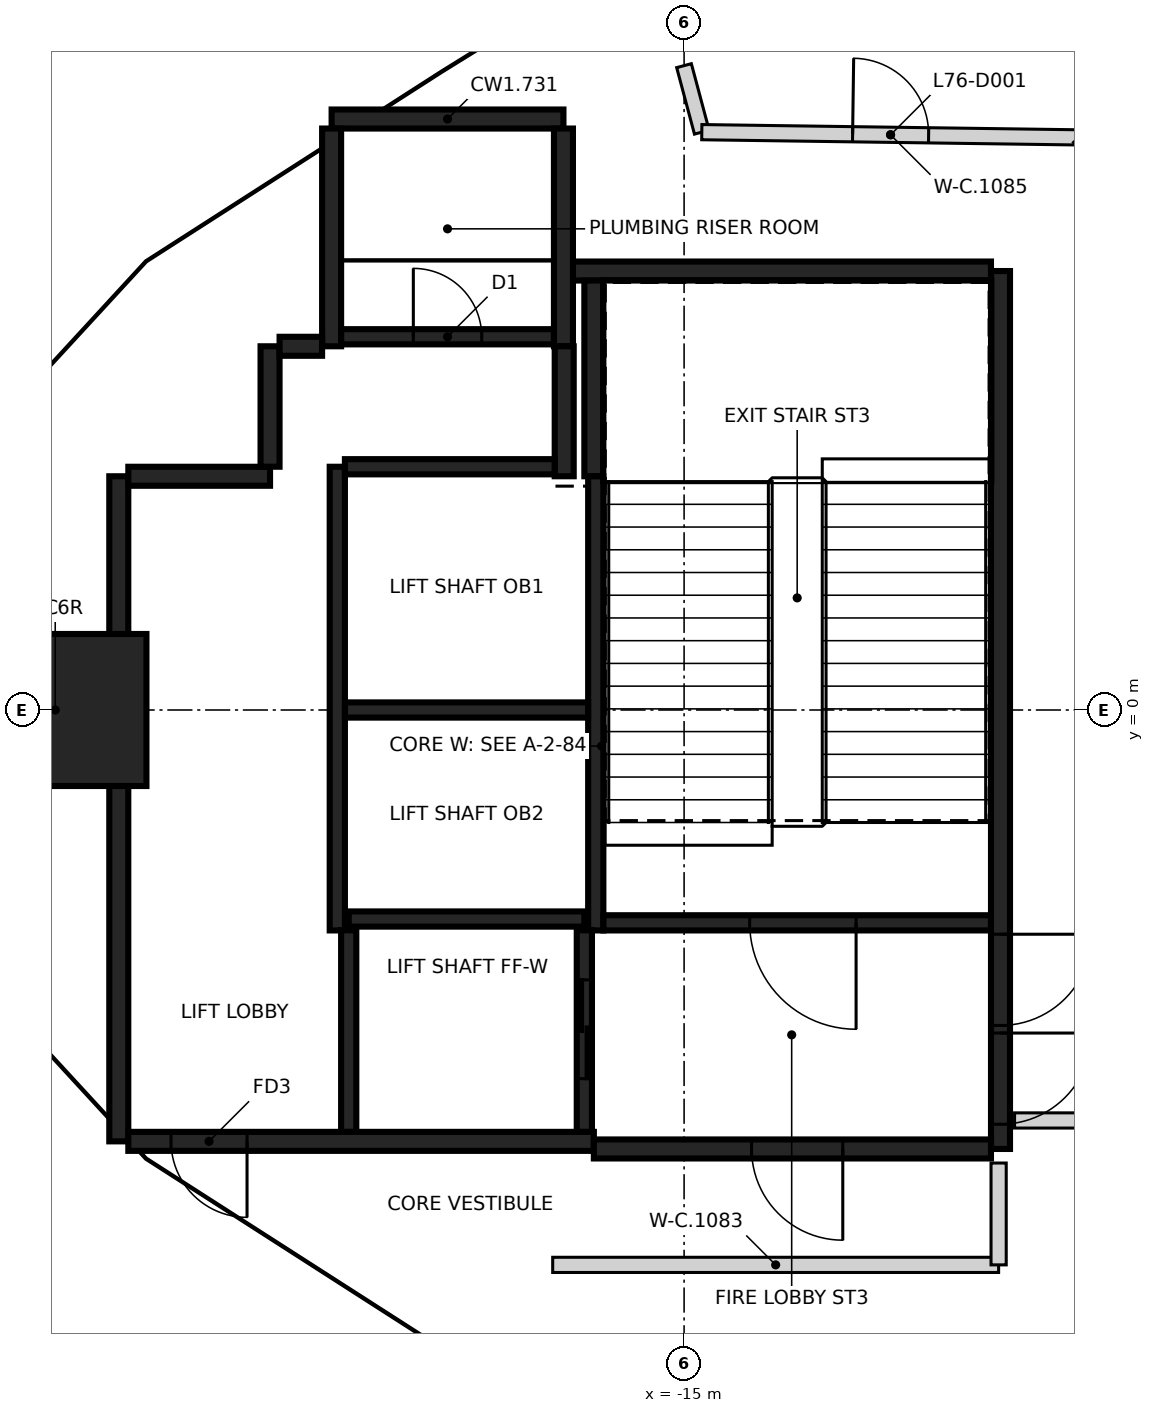
"""IFC4 building model, lengths in metres.
Left out: names, types, materials, properties, quantities, classifications, styles, units other than length and angle.
Written with IfcOpenShell. Run it as: python <this file> out.ifc"""

import sys

from ifc_helpers import new_model, si_unit, direction, frame, frame_2d, origin, origin_2d, place, context, subcontext, project, spatial, rectangle, extrude, element, fill, save


model = new_model("IFC4")
c1 = context("Model", 3, precision=1e-05, world=origin(), true_north=direction((0.0, 1.0)))
c2 = subcontext(c1, "Body", "Model", "MODEL_VIEW")
j1 = project(units=[si_unit("LENGTHUNIT", "METRE"), si_unit("PLANEANGLEUNIT", "RADIAN")], contexts=[c1])
p1 = place(None, origin())
s1 = spatial("IfcSite", under=j1, at=p1, CompositionType="ELEMENT")
p2 = place(p1, origin())
s2 = spatial("IfcBuilding", under=s1, at=p2, CompositionType="ELEMENT")
p3 = place(p2, frame((0.0, 0.0, 301.8)))
s3 = spatial("IfcBuildingStorey", under=s2, at=p3, CompositionType="ELEMENT", Elevation=301.8)
p4 = place(p3, frame((-23.273, 0.0, -0.4), z_axis=(0.0, 0.0, 1.0), x_axis=(1.0, 0.0, 0.0)))
e1 = element("IfcColumn", 1, at=p4, inside=s3, PredefinedType="COLUMN", context=c2, shape_type="SweptSolid", body=[
    extrude(rectangle(XDim=2.4, YDim=2.0, at=origin_2d()), origin(), (0.0, 0.0, 1.0), 4.85),
])
p5 = place(p3, frame((-10.837, 5.775, 0.0), z_axis=(0.0, 0.0, 1.0), x_axis=(0.0, -1.0, 0.0)))
e2 = element("IfcWall", 2, at=p5, inside=s3, PredefinedType="SHEAR", context=c2, shape_type="SweptSolid", body=[
    extrude(rectangle(XDim=11.55, YDim=0.25, at=frame_2d((5.775, 0.0))), origin(), (0.0, 0.0, 1.0), 4.45),
])
p6 = place(p5, frame((10.025, 0.0, 0.0)))
e3 = element("IfcOpeningElement", 3, at=p6, cuts=e2, PredefinedType="OPENING", context=c2, shape_type="SweptSolid", body=[
    extrude(rectangle(XDim=1.2, YDim=2.1, at=frame_2d((0.6, 1.05))), frame((0.0, 0.135, 0.0), z_axis=(0.0, -1.0, 0.0), x_axis=(1.0, 0.0, 0.0)), (0.0, 0.0, 1.0), 0.27),
])
p7 = place(p5, frame((8.725, 0.0, 0.0)))
e4 = element("IfcOpeningElement", 4, at=p7, cuts=e2, PredefinedType="OPENING", context=c2, shape_type="SweptSolid", body=[
    extrude(rectangle(XDim=1.2, YDim=2.1, at=frame_2d((0.6, 1.05))), frame((0.0, 0.135, 0.0), z_axis=(0.0, -1.0, 0.0), x_axis=(1.0, 0.0, 0.0)), (0.0, 0.0, 1.0), 0.27),
])
p8 = place(p3, frame((-22.437, -5.675, 0.0), z_axis=(0.0, 0.0, 1.0), x_axis=(0.0, 1.0, 0.0)))
e5 = element("IfcWall", 5, at=p8, inside=s3, PredefinedType="SHEAR", context=c2, shape_type="SweptSolid", body=[
    extrude(rectangle(XDim=8.75, YDim=0.25, at=frame_2d((4.375, 0.0))), origin(), (0.0, 0.0, 1.0), 4.45),
])
p9 = place(p3, frame((-16.187, -5.675, 0.0), z_axis=(0.0, 0.0, 1.0), x_axis=(-1.0, 0.0, 0.0)))
e6 = element("IfcWall", 6, at=p9, inside=s3, PredefinedType="SHEAR", context=c2, shape_type="SweptSolid", body=[
    extrude(rectangle(XDim=6.125, YDim=0.25, at=frame_2d((3.062, 0.0))), origin(), (0.0, 0.0, 1.0), 4.45),
])
p10 = place(p9, frame((4.563, 0.0, 0.0)))
e7 = element("IfcOpeningElement", 7, at=p10, cuts=e6, PredefinedType="OPENING", context=c2, shape_type="SweptSolid", body=[
    extrude(rectangle(XDim=1.0, YDim=2.1, at=frame_2d((0.5, 1.05))), frame((0.0, 0.135, 0.0), z_axis=(0.0, -1.0, 0.0), x_axis=(1.0, 0.0, 0.0)), (0.0, 0.0, 1.0), 0.27),
])
p11 = place(p3, frame((-10.963, -5.775, 0.0), z_axis=(0.0, 0.0, 1.0), x_axis=(-1.0, 0.0, 0.0)))
e8 = element("IfcWall", 8, at=p11, inside=s3, PredefinedType="SHEAR", context=c2, shape_type="SweptSolid", body=[
    extrude(rectangle(XDim=5.225, YDim=0.25, at=frame_2d((2.612, 0.0))), origin(), (0.0, 0.0, 1.0), 4.45),
])
p12 = place(p11, frame((1.95, 0.0, 0.0)))
e9 = element("IfcOpeningElement", 9, at=p12, cuts=e8, PredefinedType="OPENING", context=c2, shape_type="SweptSolid", body=[
    extrude(rectangle(XDim=1.2, YDim=2.1, at=frame_2d((0.6, 1.05))), frame((0.0, 0.135, 0.0), z_axis=(0.0, -1.0, 0.0), x_axis=(1.0, 0.0, 0.0)), (0.0, 0.0, 1.0), 0.27),
])
p13 = place(p3, frame((-16.472, 5.775, 0.0), z_axis=(0.0, 0.0, 1.0), x_axis=(1.0, 0.0, 0.0)))
e10 = element("IfcWall", 10, at=p13, inside=s3, PredefinedType="SHEAR", context=c2, shape_type="SweptSolid", body=[
    extrude(rectangle(XDim=5.51, YDim=0.25, at=frame_2d((2.755, 0.0))), origin(), (0.0, 0.0, 1.0), 4.45),
])
p14 = place(p3, frame((-19.637, 7.775, 0.0), z_axis=(0.0, 0.0, 1.0), x_axis=(1.0, 0.0, 0.0)))
e11 = element("IfcWall", 11, at=p14, inside=s3, PredefinedType="SHEAR", context=c2, shape_type="SweptSolid", body=[
    extrude(rectangle(XDim=3.05, YDim=0.25, at=frame_2d((1.525, 0.0))), origin(), (0.0, 0.0, 1.0), 4.45),
])
for number, where, z_axis, x_axis in (
    (12, (-16.587, 7.65, 0.0), (0.0, 0.0, 1.0), (0.0, -1.0, 0.0)),
    (13, (-19.637, 4.785, 0.0), (0.0, 0.0, 1.0), (0.0, 1.0, 0.0)),
):
    element("IfcWall", number, at=place(p3, frame(where, z_axis=z_axis, x_axis=x_axis)), inside=s3, PredefinedType="SHEAR", context=c2, shape_type="SweptSolid", body=[
        extrude(rectangle(XDim=2.865, YDim=0.25, at=frame_2d((1.432, 0.0))), origin(), (0.0, 0.0, 1.0), 4.45),
    ])
p15 = place(p3, frame((-16.187, 3.075, 0.0), z_axis=(0.0, 0.0, 1.0), x_axis=(0.0, 1.0, 0.0)))
e14 = element("IfcWall", 14, at=p15, inside=s3, PredefinedType="SHEAR", context=c2, shape_type="SweptSolid", body=[
    extrude(rectangle(XDim=2.575, YDim=0.25, at=frame_2d((1.287, 0.0))), origin(), (0.0, 0.0, 1.0), 4.45),
])
p16 = place(p3, frame((-22.312, 3.075, 0.0), z_axis=(0.0, 0.0, 1.0), x_axis=(1.0, 0.0, 0.0)))
e15 = element("IfcWall", 15, at=p16, inside=s3, PredefinedType="SHEAR", context=c2, shape_type="SweptSolid", body=[
    extrude(rectangle(XDim=1.865, YDim=0.25, at=frame_2d((0.932, 0.0))), origin(), (0.0, 0.0, 1.0), 4.45),
])
p17 = place(p3, frame((-16.577, 4.785, 0.0), z_axis=(0.0, 0.0, 1.0), x_axis=(0.0, -1.0, 0.0)))
e16 = element("IfcWall", 16, at=p17, inside=s3, PredefinedType="SHEAR", context=c2, shape_type="SweptSolid", body=[
    extrude(rectangle(XDim=1.71, YDim=0.25, at=frame_2d((0.855, 0.0))), origin(), (0.0, 0.0, 1.0), 4.45),
])
p18 = place(p3, frame((-20.447, 3.2, 0.0), z_axis=(0.0, 0.0, 1.0), x_axis=(0.0, 1.0, 0.0)))
e17 = element("IfcWall", 17, at=p18, inside=s3, PredefinedType="SHEAR", context=c2, shape_type="SweptSolid", body=[
    extrude(rectangle(XDim=1.584, YDim=0.25, at=frame_2d((0.792, 0.0))), origin(), (0.0, 0.0, 1.0), 4.45),
])
p19 = place(p3, frame((-20.322, 4.785, 0.0), z_axis=(0.0, 0.0, 1.0), x_axis=(1.0, 0.0, 0.0)))
e18 = element("IfcWall", 18, at=p19, inside=s3, PredefinedType="SHEAR", context=c2, shape_type="SweptSolid", body=[
    extrude(rectangle(XDim=0.559, YDim=0.25, at=frame_2d((0.28, 0.0))), origin(), (0.0, 0.0, 1.0), 4.45),
])
p20 = place(p3, frame((-16.162, 3.074, 0.0), z_axis=(0.0, 0.0, 1.0), x_axis=(0.0, -1.0, 0.0)))
e19 = element("IfcWall", 19, at=p20, inside=s3, PredefinedType="SHEAR", context=c2, shape_type="SweptSolid", body=[
    extrude(rectangle(XDim=5.974, YDim=0.2, at=frame_2d((2.987, 0.0))), origin(), (0.0, 0.0, 1.0), 4.45),
])
p21 = place(p3, frame((-19.562, -2.9, 0.0), z_axis=(0.0, 0.0, 1.0), x_axis=(0.0, 1.0, 0.0)))
e20 = element("IfcWall", 20, at=p21, inside=s3, PredefinedType="SHEAR", context=c2, shape_type="SweptSolid", body=[
    extrude(rectangle(XDim=6.1, YDim=0.2, at=frame_2d((3.05, 0.0))), origin(), (0.0, 0.0, 1.0), 4.45),
])
p22 = place(p3, frame((-10.963, -2.8, 0.0), z_axis=(0.0, 0.0, 1.0), x_axis=(-1.0, 0.0, 0.0)))
e21 = element("IfcWall", 21, at=p22, inside=s3, PredefinedType="SHEAR", context=c2, shape_type="SweptSolid", body=[
    extrude(rectangle(XDim=5.098, YDim=0.2, at=frame_2d((2.549, 0.0))), origin(), (0.0, 0.0, 1.0), 4.45),
])
p23 = place(p22, frame((1.774, 0.0, 0.0)))
e22 = element("IfcOpeningElement", 22, at=p23, cuts=e21, PredefinedType="OPENING", context=c2, shape_type="SweptSolid", body=[
    extrude(rectangle(XDim=1.4, YDim=2.1, at=frame_2d((0.7, 1.05))), frame((0.0, 0.11, 0.0), z_axis=(0.0, -1.0, 0.0), x_axis=(1.0, 0.0, 0.0)), (0.0, 0.0, 1.0), 0.22),
])
p24 = place(p3, frame((-16.263, 0.0, 0.0), z_axis=(0.0, 0.0, 1.0), x_axis=(-1.0, 0.0, 0.0)))
e23 = element("IfcWall", 23, at=p24, inside=s3, PredefinedType="SHEAR", context=c2, shape_type="SweptSolid", body=[
    extrude(rectangle(XDim=3.198, YDim=0.2, at=frame_2d((1.599, 0.0))), origin(), (0.0, 0.0, 1.0), 4.45),
])
p25 = place(p3, frame((-19.511, 4.91, 0.0), z_axis=(0.0, 0.0, 1.0), x_axis=(1.0, 0.0, 0.0)))
e24 = element("IfcWall", 24, at=p25, inside=s3, PredefinedType="SHEAR", context=c2, shape_type="SweptSolid", body=[
    extrude(rectangle(XDim=2.798, YDim=0.2, at=frame_2d((1.399, 0.0))), origin(), (0.0, 0.0, 1.0), 4.45),
])
p26 = place(p25, frame((0.949, 0.0, 0.0)))
e25 = element("IfcOpeningElement", 25, at=p26, cuts=e24, PredefinedType="OPENING", context=c2, shape_type="SweptSolid", body=[
    extrude(rectangle(XDim=0.9, YDim=2.1, at=frame_2d((0.45, 1.05))), frame((0.0, 0.11, 0.0), z_axis=(0.0, -1.0, 0.0), x_axis=(1.0, 0.0, 0.0)), (0.0, 0.0, 1.0), 0.22),
])
p27 = place(p3, frame((-19.462, 3.2, 0.0), z_axis=(0.0, 0.0, 1.0), x_axis=(1.0, 0.0, 0.0)))
e26 = element("IfcWall", 26, at=p27, inside=s3, PredefinedType="SHEAR", context=c2, shape_type="SweptSolid", body=[
    extrude(rectangle(XDim=2.759, YDim=0.2, at=frame_2d((1.379, 0.0))), origin(), (0.0, 0.0, 1.0), 4.45),
])
p28 = place(p3, frame((-19.412, -2.75, 0.0), z_axis=(0.0, 0.0, 1.0), x_axis=(1.0, 0.0, 0.0)))
e27 = element("IfcWall", 27, at=p28, inside=s3, PredefinedType="SHEAR", context=c2, shape_type="SweptSolid", body=[
    extrude(rectangle(XDim=3.1, YDim=0.2, at=frame_2d((1.55, 0.0))), origin(), (0.0, 0.0, 1.0), 4.45),
])
p29 = place(p3, frame((-16.312, -2.898, 0.0), z_axis=(0.0, 0.0, 1.0), x_axis=(0.0, -1.0, 0.0)))
e28 = element("IfcWall", 28, at=p29, inside=s3, PredefinedType="SHEAR", context=c2, shape_type="SweptSolid", body=[
    extrude(rectangle(XDim=2.651, YDim=0.2, at=frame_2d((1.325, 0.0))), origin(), (0.0, 0.0, 1.0), 4.45),
])
p30 = place(p29, frame((0.652, 0.0, 0.0)))
e29 = element("IfcOpeningElement", 29, at=p30, cuts=e28, PredefinedType="OPENING", context=c2, shape_type="SweptSolid", body=[
    extrude(rectangle(XDim=1.3, YDim=2.1, at=frame_2d((0.65, 1.05))), frame((0.0, 0.11, 0.0), z_axis=(0.0, -1.0, 0.0), x_axis=(1.0, 0.0, 0.0)), (0.0, 0.0, 1.0), 0.22),
])
p31 = place(p3, frame((-19.412, -5.549, 0.0), z_axis=(0.0, 0.0, 1.0), x_axis=(0.0, 1.0, 0.0)))
e30 = element("IfcWall", 30, at=p31, inside=s3, PredefinedType="SHEAR", context=c2, shape_type="SweptSolid", body=[
    extrude(rectangle(XDim=2.651, YDim=0.2, at=frame_2d((1.325, 0.0))), origin(), (0.0, 0.0, 1.0), 4.45),
])
p32 = place(p3, frame((-16.729, -7.3, 0.0), z_axis=(0.0, 0.0, 1.0), x_axis=(1.0, 0.0, 0.0)))
e31 = element("IfcWall", 31, at=p32, inside=s3, PredefinedType="PARTITIONING", context=c2, shape_type="SweptSolid", body=[
    extrude(rectangle(XDim=5.867, YDim=0.2, at=frame_2d((2.933, 0.0))), origin(), (0.0, 0.0, 1.0), 4.45),
])
p33 = place(p3, frame((-15.001, 8.477, 0.0), z_axis=(0.0, 0.0, 1.0), x_axis=(0.258233031799, -0.966082657586, 0.0)))
e32 = element("IfcWall", 32, at=p33, inside=s3, PredefinedType="PARTITIONING", context=c2, shape_type="SweptSolid", body=[
    extrude(rectangle(XDim=0.906, YDim=0.2, at=frame_2d((0.453, 0.0))), origin(), (0.0, 0.0, 1.0), 4.45),
])
p34 = place(p3, frame((-14.767, 7.602, 0.0), z_axis=(0.0, 0.0, 1.0), x_axis=(0.999903193163, -0.013914176312, 0.0)))
e33 = element("IfcWall", 33, at=p34, inside=s3, PredefinedType="PARTITIONING", context=c2, shape_type="SweptSolid", body=[
    extrude(rectangle(XDim=4.966, YDim=0.2, at=frame_2d((2.483, 0.0))), origin(), (0.0, 0.0, 1.0), 4.45),
])
p35 = place(p34, frame((1.984, 0.0, 0.0)))
e34 = element("IfcOpeningElement", 34, at=p35, cuts=e33, PredefinedType="OPENING", context=c2, shape_type="SweptSolid", body=[
    extrude(rectangle(XDim=1.0, YDim=2.1, at=frame_2d((0.5, 1.05))), frame((0.0, 0.11, 0.0), z_axis=(0.0, -1.0, 0.0), x_axis=(1.0, 0.0, 0.0)), (0.0, 0.0, 1.0), 0.22),
])
p36 = place(p3, frame((-10.862, -7.3, 0.0), z_axis=(0.0, 0.0, 1.0), x_axis=(0.0, 1.0, 0.0)))
e35 = element("IfcWall", 35, at=p36, inside=s3, PredefinedType="PARTITIONING", context=c2, shape_type="SweptSolid", body=[
    extrude(rectangle(XDim=1.34, YDim=0.2, at=frame_2d((0.67, 0.0))), origin(), (0.0, 0.0, 1.0), 4.45),
])
p37 = place(p3, frame((-10.652, -5.4, 0.0), z_axis=(0.0, 0.0, 1.0), x_axis=(1.0, 0.0, 0.0)))
e36 = element("IfcWall", 36, at=p37, inside=s3, PredefinedType="PARTITIONING", context=c2, shape_type="SweptSolid", body=[
    extrude(rectangle(XDim=1.798, YDim=0.2, at=frame_2d((0.899, 0.0))), origin(), (0.0, 0.0, 1.0), 4.45),
])
p38 = place(p3, frame((-9.802, 7.533, 0.0), z_axis=(0.0, 0.0, 1.0), x_axis=(0.660992214586, -0.750392758665, 0.0)))
e37 = element("IfcWall", 37, at=p38, inside=s3, PredefinedType="PARTITIONING", context=c2, shape_type="SweptSolid", body=[
    extrude(rectangle(XDim=4.44, YDim=0.2, at=frame_2d((2.22, 0.0))), origin(), (0.0, 0.0, 1.0), 4.45),
])
p39 = place(p30, origin())
e38 = element("IfcDoor", 38, at=p39, inside=s3, OperationType="SLIDING_TO_RIGHT", PredefinedType="DOOR", context=c2, shape_type="SweptSolid", body=[
    extrude(rectangle(XDim=1.3, YDim=2.1, at=frame_2d((0.65, 1.05))), frame((0.0, 0.025, 0.0), z_axis=(0.0, -1.0, 0.0), x_axis=(1.0, 0.0, 0.0)), (0.0, 0.0, 1.0), 0.05),
])
fill(e29, e38)
p40 = place(p10, origin())
e39 = element("IfcDoor", 39, at=p40, inside=s3, OperationType="SINGLE_SWING_LEFT", PredefinedType="DOOR", context=c2, shape_type="SweptSolid", body=[
    extrude(rectangle(XDim=1.0, YDim=2.1, at=frame_2d((0.5, 1.05))), frame((0.0, 0.025, 0.0), z_axis=(0.0, -1.0, 0.0), x_axis=(1.0, 0.0, 0.0)), (0.0, 0.0, 1.0), 0.05),
])
fill(e7, e39)
p41 = place(p6, origin())
e40 = element("IfcDoor", 40, at=p41, inside=s3, OperationType="SINGLE_SWING_LEFT", PredefinedType="DOOR", context=c2, shape_type="SweptSolid", body=[
    extrude(rectangle(XDim=1.2, YDim=2.1, at=frame_2d((0.6, 1.05))), frame((0.0, 0.025, 0.0), z_axis=(0.0, -1.0, 0.0), x_axis=(1.0, 0.0, 0.0)), (0.0, 0.0, 1.0), 0.05),
])
fill(e3, e40)
p42 = place(p7, origin())
e41 = element("IfcDoor", 41, at=p42, inside=s3, OperationType="SINGLE_SWING_RIGHT", PredefinedType="DOOR", context=c2, shape_type="SweptSolid", body=[
    extrude(rectangle(XDim=1.2, YDim=2.1, at=frame_2d((0.6, 1.05))), frame((0.0, 0.025, 0.0), z_axis=(0.0, -1.0, 0.0), x_axis=(1.0, 0.0, 0.0)), (0.0, 0.0, 1.0), 0.05),
])
fill(e4, e41)
p43 = place(p23, origin())
e42 = element("IfcDoor", 42, at=p43, inside=s3, OperationType="SINGLE_SWING_RIGHT", PredefinedType="DOOR", context=c2, shape_type="SweptSolid", body=[
    extrude(rectangle(XDim=1.4, YDim=2.1, at=frame_2d((0.7, 1.05))), frame((0.0, 0.025, 0.0), z_axis=(0.0, -1.0, 0.0), x_axis=(1.0, 0.0, 0.0)), (0.0, 0.0, 1.0), 0.05),
])
fill(e22, e42)
p44 = place(p26, origin())
e43 = element("IfcDoor", 43, at=p44, inside=s3, OperationType="SINGLE_SWING_LEFT", PredefinedType="DOOR", context=c2, shape_type="SweptSolid", body=[
    extrude(rectangle(XDim=0.9, YDim=2.1, at=frame_2d((0.45, 1.05))), frame((0.0, 0.025, 0.0), z_axis=(0.0, -1.0, 0.0), x_axis=(1.0, 0.0, 0.0)), (0.0, 0.0, 1.0), 0.05),
])
fill(e25, e43)
p45 = place(p12, origin())
e44 = element("IfcDoor", 44, at=p45, inside=s3, OperationType="SINGLE_SWING_LEFT", PredefinedType="DOOR", context=c2, shape_type="SweptSolid", body=[
    extrude(rectangle(XDim=1.2, YDim=2.1, at=frame_2d((0.6, 1.05))), frame((0.0, 0.025, 0.0), z_axis=(0.0, -1.0, 0.0), x_axis=(1.0, 0.0, 0.0)), (0.0, 0.0, 1.0), 0.05),
])
fill(e9, e44)
p46 = place(p35, origin())
e45 = element("IfcDoor", 45, at=p46, inside=s3, OperationType="SINGLE_SWING_LEFT", PredefinedType="DOOR", context=c2, shape_type="SweptSolid", body=[
    extrude(rectangle(XDim=1.0, YDim=2.1, at=frame_2d((0.5, 1.05))), frame((0.0, 0.025, 0.0), z_axis=(0.0, -1.0, 0.0), x_axis=(1.0, 0.0, 0.0)), (0.0, 0.0, 1.0), 0.05),
])
fill(e34, e45)
save(model, sys.argv[1])
